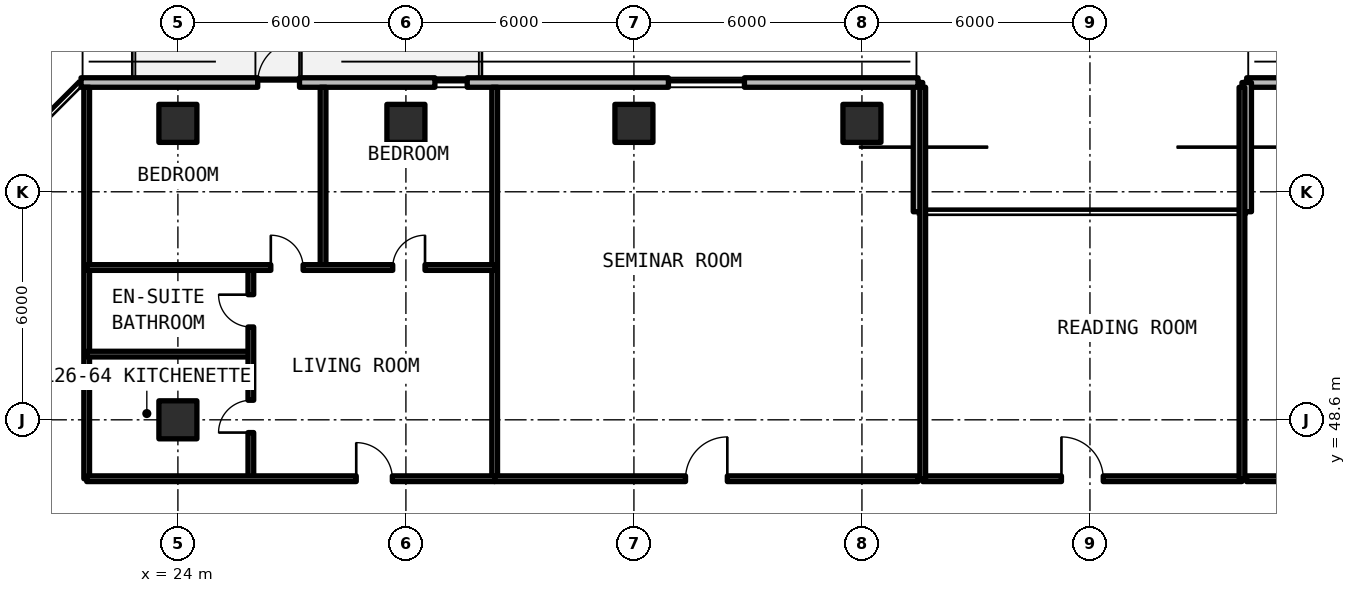
"""IFC4 building model, lengths in metres.
Left out: names, types, materials, properties, quantities, classifications, styles, units other than length and angle.
Written with IfcOpenShell. Run it as: python <this file> out.ifc"""

import sys

from ifc_helpers import new_model, si_unit, direction, frame, frame_2d, origin, origin_2d, place, context, subcontext, project, spatial, rectangle, extrude, element, fill, save


model = new_model("IFC4")
c1 = context("Model", 3, precision=1e-05, world=origin(), true_north=direction((0.0, 1.0)))
c2 = subcontext(c1, "Body", "Model", "MODEL_VIEW")
j1 = project(units=[si_unit("LENGTHUNIT", "METRE"), si_unit("PLANEANGLEUNIT", "RADIAN")], contexts=[c1])
p1 = place(None, origin())
s1 = spatial("IfcSite", under=j1, at=p1, CompositionType="ELEMENT")
p2 = place(p1, origin())
s2 = spatial("IfcBuilding", under=s1, at=p2, CompositionType="ELEMENT")
p3 = place(p2, frame((0.0, 0.0, 95.37)))
s3 = spatial("IfcBuildingStorey", under=s2, at=p3, CompositionType="ELEMENT", Elevation=95.37)
for number, where, z_axis, x_axis in (
    (1, (24.0, 48.6, 0.0), (0.0, 0.0, 1.0), (1.0, 0.0, 0.0)),
    (2, (24.0, 56.4, 0.0), (0.0, 0.0, 1.0), (1.0, 0.0, 0.0)),
    (3, (30.0, 56.4, 0.0), (0.0, 0.0, 1.0), (1.0, 0.0, 0.0)),
    (4, (36.0, 56.4, 0.0), (0.0, 0.0, 1.0), (1.0, 0.0, 0.0)),
    (5, (42.0, 56.4, 0.0), (0.0, 0.0, 1.0), (1.0, 0.0, 0.0)),
):
    element("IfcColumn", number, at=place(p3, frame(where, z_axis=z_axis, x_axis=x_axis)), inside=s3, PredefinedType="COLUMN", context=c2, shape_type="SweptSolid", body=[
        extrude(rectangle(XDim=1.0, YDim=1.0, at=origin_2d()), origin(), (0.0, 0.0, 1.0), 3.3),
    ])
p4 = place(p3, frame((96.148, 57.475, 0.0), z_axis=(0.0, 0.0, 1.0), x_axis=(-1.0, 0.0, 0.0)))
e6 = element("IfcWall", 6, at=p4, inside=s3, PredefinedType="SOLIDWALL", context=c2, shape_type="SweptSolid", body=[
    extrude(rectangle(XDim=44.023, YDim=0.25, at=frame_2d((22.012, 0.0))), origin(), (0.0, 0.0, 1.0), 3.08),
])
p5 = place(p4, frame((33.148, 0.0, 0.0)))
e7 = element("IfcOpeningElement", 7, at=p5, cuts=e6, PredefinedType="OPENING", context=c2, shape_type="SweptSolid", body=[
    extrude(rectangle(XDim=1.1, YDim=2.15, at=frame_2d((0.55, 1.075))), frame((0.0, 0.135, 0.0), z_axis=(0.0, -1.0, 0.0), x_axis=(1.0, 0.0, 0.0)), (0.0, 0.0, 1.0), 0.27),
])
p6 = place(p4, frame((21.298, 0.0, 0.0)))
e8 = element("IfcOpeningElement", 8, at=p6, cuts=e6, PredefinedType="OPENING", context=c2, shape_type="SweptSolid", body=[
    extrude(rectangle(XDim=1.1, YDim=2.15, at=frame_2d((0.55, 1.075))), frame((0.0, 0.135, 0.0), z_axis=(0.0, -1.0, 0.0), x_axis=(1.0, 0.0, 0.0)), (0.0, 0.0, 1.0), 0.27),
])
p7 = place(p4, frame((9.198, 0.0, 0.0)))
e9 = element("IfcOpeningElement", 9, at=p7, cuts=e6, PredefinedType="OPENING", context=c2, shape_type="SweptSolid", body=[
    extrude(rectangle(XDim=1.1, YDim=2.15, at=frame_2d((0.55, 1.075))), frame((0.0, 0.135, 0.0), z_axis=(0.0, -1.0, 0.0), x_axis=(1.0, 0.0, 0.0)), (0.0, 0.0, 1.0), 0.27),
])
p8 = place(p4, frame((39.334, 0.0, 0.78)))
e10 = element("IfcOpeningElement", 10, at=p8, cuts=e6, PredefinedType="OPENING", context=c2, shape_type="SweptSolid", body=[
    extrude(rectangle(XDim=2.0, YDim=1.66, at=frame_2d((1.0, 0.83))), frame((0.0, 0.135, 0.0), z_axis=(0.0, -1.0, 0.0), x_axis=(1.0, 0.0, 0.0)), (0.0, 0.0, 1.0), 0.27),
])
p9 = place(p4, frame((27.354, 0.0, 0.78)))
e11 = element("IfcOpeningElement", 11, at=p9, cuts=e6, PredefinedType="OPENING", context=c2, shape_type="SweptSolid", body=[
    extrude(rectangle(XDim=2.0, YDim=1.66, at=frame_2d((1.0, 0.83))), frame((0.0, 0.135, 0.0), z_axis=(0.0, -1.0, 0.0), x_axis=(1.0, 0.0, 0.0)), (0.0, 0.0, 1.0), 0.27),
])
p10 = place(p4, frame((14.76, 0.0, 0.78)))
e12 = element("IfcOpeningElement", 12, at=p10, cuts=e6, PredefinedType="OPENING", context=c2, shape_type="SweptSolid", body=[
    extrude(rectangle(XDim=2.0, YDim=1.66, at=frame_2d((1.0, 0.83))), frame((0.0, 0.135, 0.0), z_axis=(0.0, -1.0, 0.0), x_axis=(1.0, 0.0, 0.0)), (0.0, 0.0, 1.0), 0.27),
])
p11 = place(p4, frame((3.066, 0.0, 0.78)))
e13 = element("IfcOpeningElement", 13, at=p11, cuts=e6, PredefinedType="OPENING", context=c2, shape_type="SweptSolid", body=[
    extrude(rectangle(XDim=2.0, YDim=1.66, at=frame_2d((1.0, 0.83))), frame((0.0, 0.135, 0.0), z_axis=(0.0, -1.0, 0.0), x_axis=(1.0, 0.0, 0.0)), (0.0, 0.0, 1.0), 0.27),
])
for number, where, z_axis, x_axis in (
    (14, (52.125, 57.475, 0.0), (0.0, 0.0, 1.0), (0.0, -1.0, 0.0)),
    (15, (43.475, 54.075, 0.0), (0.0, 0.0, 1.0), (0.0, 1.0, 0.0)),
):
    element("IfcWall", number, at=place(p3, frame(where, z_axis=z_axis, x_axis=x_axis)), inside=s3, PredefinedType="SOLIDWALL", context=c2, shape_type="SweptSolid", body=[
        extrude(rectangle(XDim=3.4, YDim=0.25, at=frame_2d((1.7, 0.0))), origin(), (0.0, 0.0, 1.0), 3.08),
    ])
p12 = place(p3, frame((43.475, 57.475, 0.0), z_axis=(0.0, 0.0, 1.0), x_axis=(-1.0, 0.0, 0.0)))
e16 = element("IfcWall", 16, at=p12, inside=s3, PredefinedType="SOLIDWALL", context=c2, shape_type="SweptSolid", body=[
    extrude(rectangle(XDim=22.023, YDim=0.25, at=frame_2d((11.012, 0.0))), origin(), (0.0, 0.0, 1.0), 3.08),
])
p13 = place(p12, frame((16.275, 0.0, 0.0)))
e17 = element("IfcOpeningElement", 17, at=p13, cuts=e16, PredefinedType="OPENING", context=c2, shape_type="SweptSolid", body=[
    extrude(rectangle(XDim=1.1, YDim=2.15, at=frame_2d((0.55, 1.075))), frame((0.0, 0.135, 0.0), z_axis=(0.0, -1.0, 0.0), x_axis=(1.0, 0.0, 0.0)), (0.0, 0.0, 1.0), 0.27),
])
p14 = place(p12, frame((11.862, 0.0, 0.78)))
e18 = element("IfcOpeningElement", 18, at=p14, cuts=e16, PredefinedType="OPENING", context=c2, shape_type="SweptSolid", body=[
    extrude(rectangle(XDim=0.85, YDim=1.65, at=frame_2d((0.425, 0.825))), frame((0.0, 0.135, 0.0), z_axis=(0.0, -1.0, 0.0), x_axis=(1.0, 0.0, 0.0)), (0.0, 0.0, 1.0), 0.27),
])
p15 = place(p12, frame((4.567, 0.0, 0.78)))
e19 = element("IfcOpeningElement", 19, at=p15, cuts=e16, PredefinedType="OPENING", context=c2, shape_type="SweptSolid", body=[
    extrude(rectangle(XDim=2.0, YDim=1.66, at=frame_2d((1.0, 0.83))), frame((0.0, 0.135, 0.0), z_axis=(0.0, -1.0, 0.0), x_axis=(1.0, 0.0, 0.0)), (0.0, 0.0, 1.0), 0.27),
])
p16 = place(p3, frame((43.6, 47.05, 0.0), z_axis=(0.0, 0.0, 1.0), x_axis=(1.0, 0.0, 0.0)))
e20 = element("IfcWall", 20, at=p16, inside=s3, PredefinedType="SOLIDWALL", context=c2, shape_type="SweptSolid", body=[
    extrude(rectangle(XDim=8.4, YDim=0.15, at=frame_2d((4.2, 0.0))), origin(), (0.0, 0.0, 1.0), 2.35),
])
p17 = place(p16, frame((3.65, 0.0, 0.0)))
e21 = element("IfcOpeningElement", 21, at=p17, cuts=e20, PredefinedType="OPENING", context=c2, shape_type="SweptSolid", body=[
    extrude(rectangle(XDim=1.1, YDim=2.15, at=frame_2d((0.55, 1.075))), frame((0.0, 0.085, 0.0), z_axis=(0.0, -1.0, 0.0), x_axis=(1.0, 0.0, 0.0)), (0.0, 0.0, 1.0), 0.17),
])
for number, where, z_axis, x_axis in (
    (22, (43.6, 47.05, 0.0), (0.0, 0.0, 1.0), (0.0, 1.0, 0.0)),
    (23, (52.0, 47.05, 0.0), (0.0, 0.0, 1.0), (0.0, 1.0, 0.0)),
    (24, (21.6, 47.05, 0.0), (0.0, 0.0, 1.0), (0.0, 1.0, 0.0)),
    (25, (32.336, 47.05, 0.0), (0.0, 0.0, 1.0), (0.0, 1.0, 0.0)),
):
    element("IfcWall", number, at=place(p3, frame(where, z_axis=z_axis, x_axis=x_axis)), inside=s3, PredefinedType="SOLIDWALL", context=c2, shape_type="SweptSolid", body=[
        extrude(rectangle(XDim=10.3, YDim=0.15, at=frame_2d((5.15, 0.0))), origin(), (0.0, 0.0, 1.0), 2.35),
    ])
p18 = place(p3, frame((21.6, 50.329, 0.0), z_axis=(0.0, 0.0, 1.0), x_axis=(1.0, 0.0, 0.0)))
e26 = element("IfcWall", 26, at=p18, inside=s3, PredefinedType="PARTITIONING", context=c2, shape_type="SweptSolid", body=[
    extrude(rectangle(XDim=4.32, YDim=0.15, at=frame_2d((2.16, 0.0))), origin(), (0.0, 0.0, 1.0), 2.35),
])
p19 = place(p3, frame((25.92, 47.05, 0.0), z_axis=(0.0, 0.0, 1.0), x_axis=(0.0, 1.0, 0.0)))
e27 = element("IfcWall", 27, at=p19, inside=s3, PredefinedType="PARTITIONING", context=c2, shape_type="SweptSolid", body=[
    extrude(rectangle(XDim=5.557, YDim=0.15, at=frame_2d((2.779, 0.0))), origin(), (0.0, 0.0, 1.0), 2.35),
])
p20 = place(p19, frame((1.214, 0.0, 0.0)))
e28 = element("IfcOpeningElement", 28, at=p20, cuts=e27, PredefinedType="OPENING", context=c2, shape_type="SweptSolid", body=[
    extrude(rectangle(XDim=0.85, YDim=2.1, at=frame_2d((0.425, 1.05))), frame((0.0, 0.085, 0.0), z_axis=(0.0, -1.0, 0.0), x_axis=(1.0, 0.0, 0.0)), (0.0, 0.0, 1.0), 0.17),
])
p21 = place(p19, frame((3.993, 0.0, 0.0)))
e29 = element("IfcOpeningElement", 29, at=p21, cuts=e27, PredefinedType="OPENING", context=c2, shape_type="SweptSolid", body=[
    extrude(rectangle(XDim=0.85, YDim=2.1, at=frame_2d((0.425, 1.05))), frame((0.0, 0.085, 0.0), z_axis=(0.0, -1.0, 0.0), x_axis=(1.0, 0.0, 0.0)), (0.0, 0.0, 1.0), 0.17),
])
p22 = place(p3, frame((27.82, 52.607, 0.0), z_axis=(0.0, 0.0, 1.0), x_axis=(0.0, 1.0, 0.0)))
e30 = element("IfcWall", 30, at=p22, inside=s3, PredefinedType="PARTITIONING", context=c2, shape_type="SweptSolid", body=[
    extrude(rectangle(XDim=4.743, YDim=0.15, at=frame_2d((2.372, 0.0))), origin(), (0.0, 0.0, 1.0), 2.35),
])
p23 = place(p3, frame((21.6, 52.607, 0.0), z_axis=(0.0, 0.0, 1.0), x_axis=(1.0, 0.0, 0.0)))
e31 = element("IfcWall", 31, at=p23, inside=s3, PredefinedType="PARTITIONING", context=c2, shape_type="SweptSolid", body=[
    extrude(rectangle(XDim=10.736, YDim=0.15, at=frame_2d((5.368, 0.0))), origin(), (0.0, 0.0, 1.0), 2.35),
])
p24 = place(p23, frame((4.845, 0.0, 0.0)))
e32 = element("IfcOpeningElement", 32, at=p24, cuts=e31, PredefinedType="OPENING", context=c2, shape_type="SweptSolid", body=[
    extrude(rectangle(XDim=0.85, YDim=2.1, at=frame_2d((0.425, 1.05))), frame((0.0, 0.085, 0.0), z_axis=(0.0, -1.0, 0.0), x_axis=(1.0, 0.0, 0.0)), (0.0, 0.0, 1.0), 0.17),
])
p25 = place(p23, frame((8.053, 0.0, 0.0)))
e33 = element("IfcOpeningElement", 33, at=p25, cuts=e31, PredefinedType="OPENING", context=c2, shape_type="SweptSolid", body=[
    extrude(rectangle(XDim=0.85, YDim=2.1, at=frame_2d((0.425, 1.05))), frame((0.0, 0.085, 0.0), z_axis=(0.0, -1.0, 0.0), x_axis=(1.0, 0.0, 0.0)), (0.0, 0.0, 1.0), 0.17),
])
p26 = place(p3, frame((21.6, 47.05, 0.0), z_axis=(0.0, 0.0, 1.0), x_axis=(1.0, 0.0, 0.0)))
e34 = element("IfcWall", 34, at=p26, inside=s3, PredefinedType="SOLIDWALL", context=c2, shape_type="SweptSolid", body=[
    extrude(rectangle(XDim=10.736, YDim=0.15, at=frame_2d((5.368, 0.0))), origin(), (0.0, 0.0, 1.0), 2.35),
])
p27 = place(p26, frame((7.093, 0.0, 0.0)))
e35 = element("IfcOpeningElement", 35, at=p27, cuts=e34, PredefinedType="OPENING", context=c2, shape_type="SweptSolid", body=[
    extrude(rectangle(XDim=0.95, YDim=2.15, at=frame_2d((0.475, 1.075))), frame((0.0, 0.085, 0.0), z_axis=(0.0, -1.0, 0.0), x_axis=(1.0, 0.0, 0.0)), (0.0, 0.0, 1.0), 0.17),
])
p28 = place(p3, frame((32.336, 47.05, 0.0), z_axis=(0.0, 0.0, 1.0), x_axis=(1.0, 0.0, 0.0)))
e36 = element("IfcWall", 36, at=p28, inside=s3, PredefinedType="SOLIDWALL", context=c2, shape_type="SweptSolid", body=[
    extrude(rectangle(XDim=11.144, YDim=0.15, at=frame_2d((5.572, 0.0))), origin(), (0.0, 0.0, 1.0), 2.35),
])
p29 = place(p28, frame((5.022, 0.0, 0.0)))
e37 = element("IfcOpeningElement", 37, at=p29, cuts=e36, PredefinedType="OPENING", context=c2, shape_type="SweptSolid", body=[
    extrude(rectangle(XDim=1.1, YDim=2.15, at=frame_2d((0.55, 1.075))), frame((0.0, 0.085, 0.0), z_axis=(0.0, -1.0, 0.0), x_axis=(1.0, 0.0, 0.0)), (0.0, 0.0, 1.0), 0.17),
])
p30 = place(p3, frame((52.12, 47.05, 0.0), z_axis=(0.0, 0.0, 1.0), x_axis=(1.0, 0.0, 0.0)))
e38 = element("IfcWall", 38, at=p30, inside=s3, PredefinedType="SOLIDWALL", context=c2, shape_type="SweptSolid", body=[
    extrude(rectangle(XDim=7.388, YDim=0.15, at=frame_2d((3.694, 0.0))), origin(), (0.0, 0.0, 1.0), 2.35),
])
p31 = place(p30, frame((3.144, 0.0, 0.0)))
e39 = element("IfcOpeningElement", 39, at=p31, cuts=e38, PredefinedType="OPENING", context=c2, shape_type="SweptSolid", body=[
    extrude(rectangle(XDim=1.1, YDim=2.15, at=frame_2d((0.55, 1.075))), frame((0.0, 0.085, 0.0), z_axis=(0.0, -1.0, 0.0), x_axis=(1.0, 0.0, 0.0)), (0.0, 0.0, 1.0), 0.17),
])
p32 = place(p13, frame((1.1, 0.0, 0.0), z_axis=(0.0, 0.0, 1.0), x_axis=(-1.0, 0.0, 0.0)))
e40 = element("IfcDoor", 40, at=p32, inside=s3, OperationType="SINGLE_SWING_RIGHT", PredefinedType="DOOR", context=c2, shape_type="SweptSolid", body=[
    extrude(rectangle(XDim=1.1, YDim=2.15, at=frame_2d((0.55, 1.075))), frame((0.0, 0.025, 0.0), z_axis=(0.0, -1.0, 0.0), x_axis=(1.0, 0.0, 0.0)), (0.0, 0.0, 1.0), 0.05),
])
fill(e17, e40)
p33 = place(p14, origin())
e41 = element("IfcWindow", 41, at=p33, inside=s3, PartitioningType="SINGLE_PANEL", PredefinedType="WINDOW", context=c2, shape_type="SweptSolid", body=[
    extrude(rectangle(XDim=0.85, YDim=1.65, at=frame_2d((0.425, 0.825))), frame((0.0, 0.03, 0.0), z_axis=(0.0, -1.0, 0.0), x_axis=(1.0, 0.0, 0.0)), (0.0, 0.0, 1.0), 0.06),
])
fill(e18, e41)
p34 = place(p15, origin())
e42 = element("IfcWindow", 42, at=p34, inside=s3, PartitioningType="SINGLE_PANEL", PredefinedType="WINDOW", context=c2, shape_type="SweptSolid", body=[
    extrude(rectangle(XDim=2.0, YDim=1.66, at=frame_2d((1.0, 0.83))), frame((0.0, 0.03, 0.0), z_axis=(0.0, -1.0, 0.0), x_axis=(1.0, 0.0, 0.0)), (0.0, 0.0, 1.0), 0.06),
])
fill(e19, e42)
p35 = place(p17, origin())
e43 = element("IfcDoor", 43, at=p35, inside=s3, OperationType="SINGLE_SWING_LEFT", PredefinedType="DOOR", context=c2, shape_type="SweptSolid", body=[
    extrude(rectangle(XDim=1.1, YDim=2.15, at=frame_2d((0.55, 1.075))), frame((0.0, 0.025, 0.0), z_axis=(0.0, -1.0, 0.0), x_axis=(1.0, 0.0, 0.0)), (0.0, 0.0, 1.0), 0.05),
])
fill(e21, e43)
p36 = place(p20, origin())
e44 = element("IfcDoor", 44, at=p36, inside=s3, OperationType="SINGLE_SWING_LEFT", PredefinedType="DOOR", context=c2, shape_type="SweptSolid", body=[
    extrude(rectangle(XDim=0.85, YDim=2.1, at=frame_2d((0.425, 1.05))), frame((0.0, 0.025, 0.0), z_axis=(0.0, -1.0, 0.0), x_axis=(1.0, 0.0, 0.0)), (0.0, 0.0, 1.0), 0.05),
])
fill(e28, e44)
p37 = place(p21, origin())
e45 = element("IfcDoor", 45, at=p37, inside=s3, OperationType="SINGLE_SWING_RIGHT", PredefinedType="DOOR", context=c2, shape_type="SweptSolid", body=[
    extrude(rectangle(XDim=0.85, YDim=2.1, at=frame_2d((0.425, 1.05))), frame((0.0, 0.025, 0.0), z_axis=(0.0, -1.0, 0.0), x_axis=(1.0, 0.0, 0.0)), (0.0, 0.0, 1.0), 0.05),
])
fill(e29, e45)
p38 = place(p24, origin())
e46 = element("IfcDoor", 46, at=p38, inside=s3, OperationType="SINGLE_SWING_LEFT", PredefinedType="DOOR", context=c2, shape_type="SweptSolid", body=[
    extrude(rectangle(XDim=0.85, YDim=2.1, at=frame_2d((0.425, 1.05))), frame((0.0, 0.025, 0.0), z_axis=(0.0, -1.0, 0.0), x_axis=(1.0, 0.0, 0.0)), (0.0, 0.0, 1.0), 0.05),
])
fill(e32, e46)
p39 = place(p25, origin())
e47 = element("IfcDoor", 47, at=p39, inside=s3, OperationType="SINGLE_SWING_RIGHT", PredefinedType="DOOR", context=c2, shape_type="SweptSolid", body=[
    extrude(rectangle(XDim=0.85, YDim=2.1, at=frame_2d((0.425, 1.05))), frame((0.0, 0.025, 0.0), z_axis=(0.0, -1.0, 0.0), x_axis=(1.0, 0.0, 0.0)), (0.0, 0.0, 1.0), 0.05),
])
fill(e33, e47)
p40 = place(p27, origin())
e48 = element("IfcDoor", 48, at=p40, inside=s3, OperationType="SINGLE_SWING_LEFT", PredefinedType="DOOR", context=c2, shape_type="SweptSolid", body=[
    extrude(rectangle(XDim=0.95, YDim=2.15, at=frame_2d((0.475, 1.075))), frame((0.0, 0.025, 0.0), z_axis=(0.0, -1.0, 0.0), x_axis=(1.0, 0.0, 0.0)), (0.0, 0.0, 1.0), 0.05),
])
fill(e35, e48)
p41 = place(p29, origin())
e49 = element("IfcDoor", 49, at=p41, inside=s3, OperationType="SINGLE_SWING_RIGHT", PredefinedType="DOOR", context=c2, shape_type="SweptSolid", body=[
    extrude(rectangle(XDim=1.1, YDim=2.15, at=frame_2d((0.55, 1.075))), frame((0.0, 0.025, 0.0), z_axis=(0.0, -1.0, 0.0), x_axis=(1.0, 0.0, 0.0)), (0.0, 0.0, 1.0), 0.05),
])
fill(e37, e49)
save(model, sys.argv[1])
